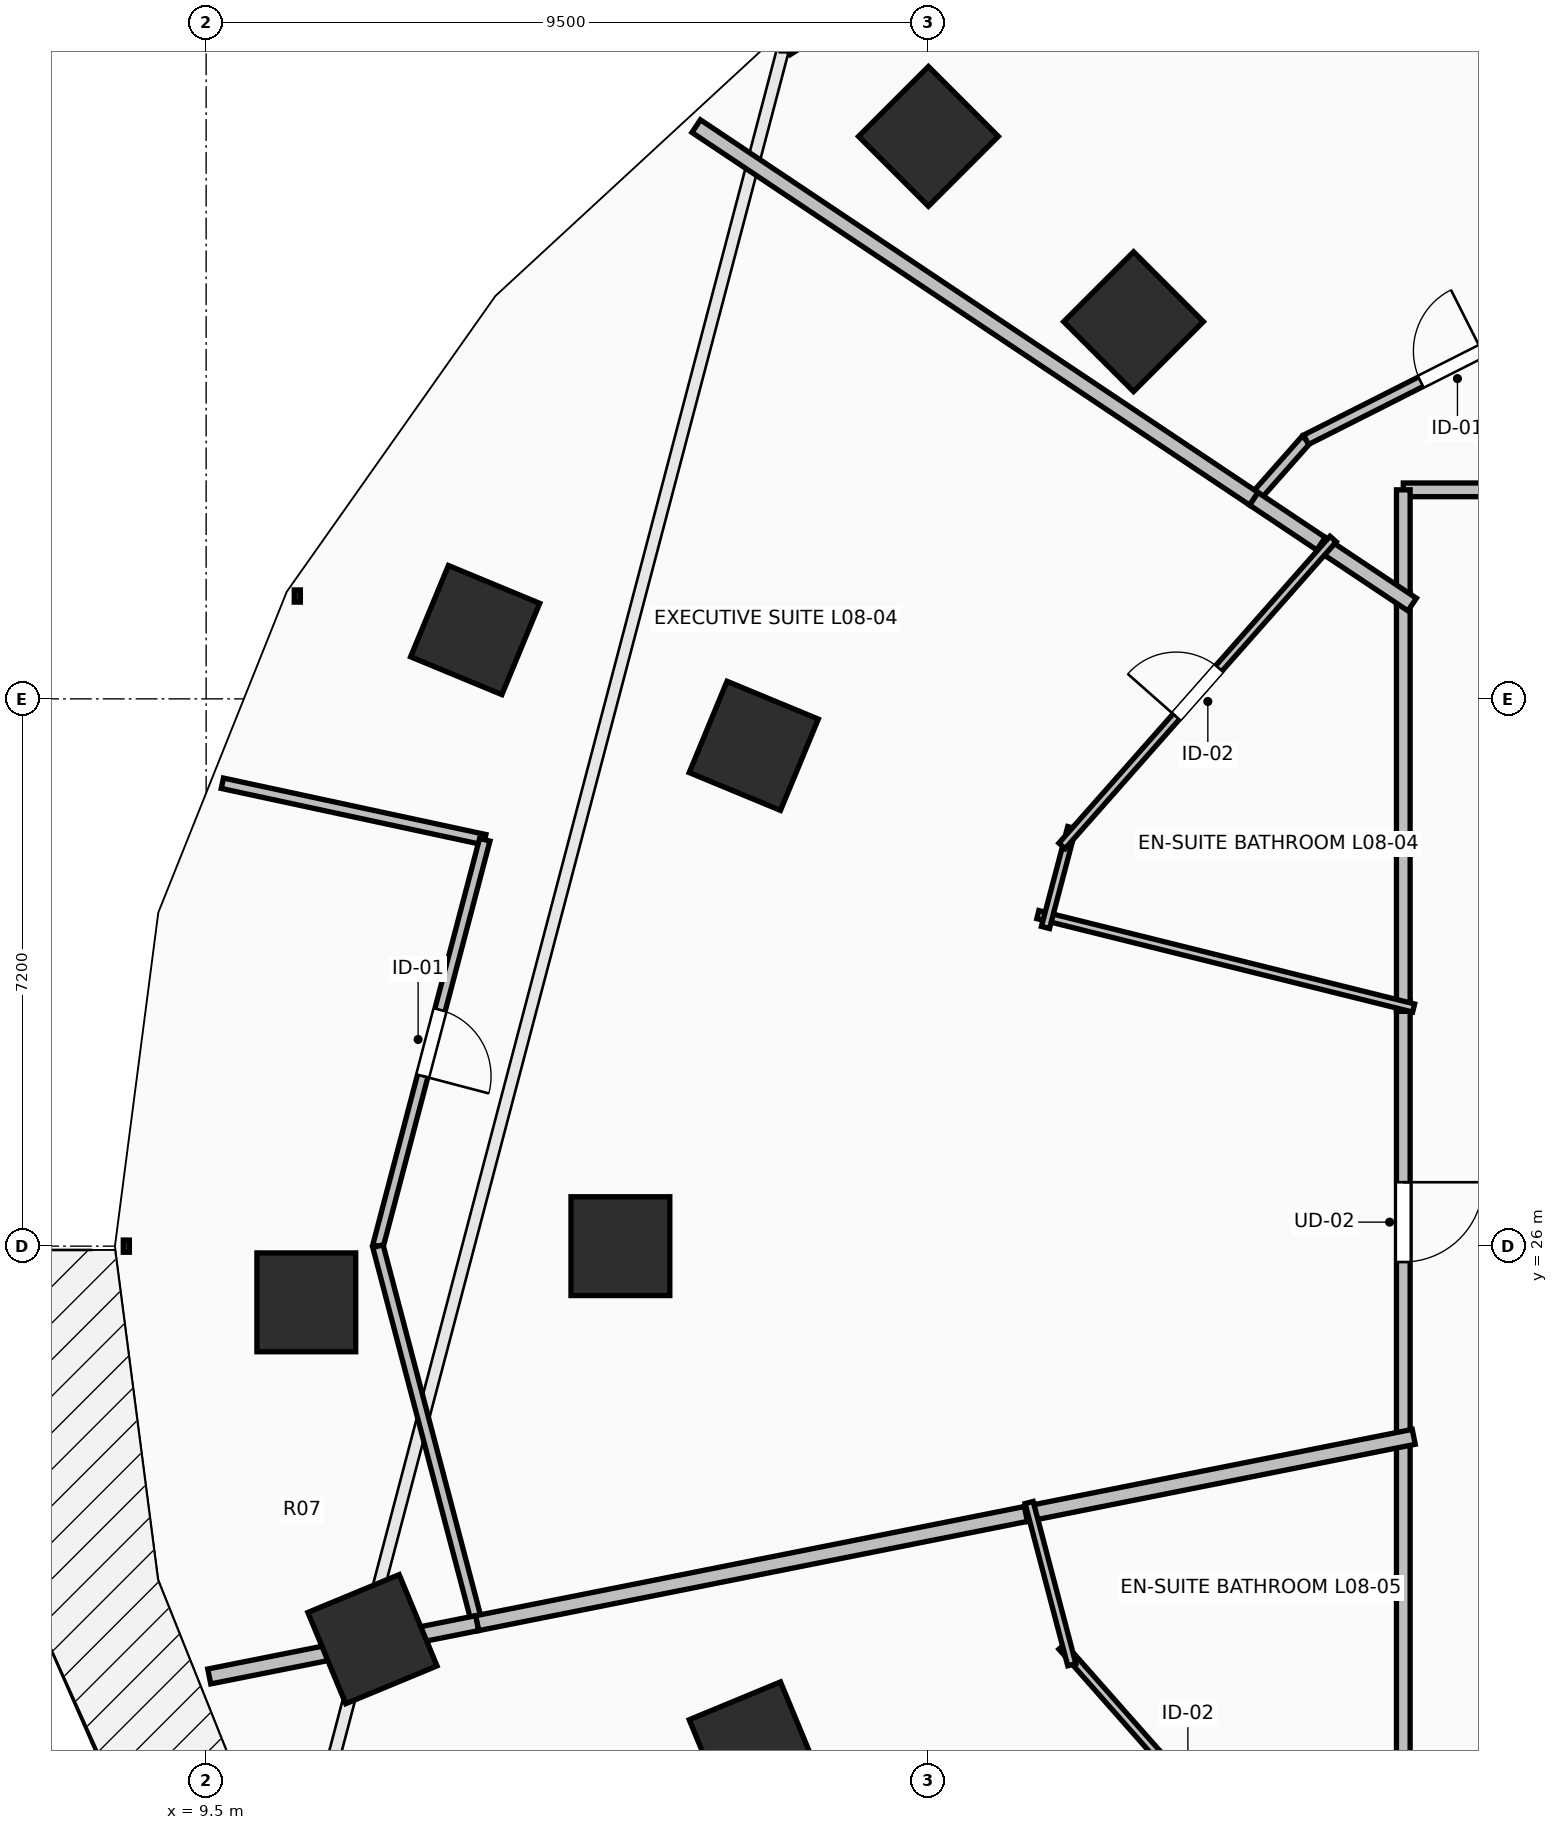
"""IFC4 building model, lengths in metres.
Left out: names, types, materials, properties, quantities, classifications, styles, units other than length and angle.
Written with IfcOpenShell. Run it as: python <this file> out.ifc"""

import sys

from ifc_helpers import new_model, si_unit, direction, frame, frame_2d, origin, origin_2d, place, context, subcontext, project, spatial, rectangle, extrude, element, fill, save


model = new_model("IFC4")
c1 = context("Model", 3, precision=1e-05, world=origin(), true_north=direction((0.0, 1.0)))
c2 = subcontext(c1, "Body", "Model", "MODEL_VIEW")
j1 = project(units=[si_unit("LENGTHUNIT", "METRE"), si_unit("PLANEANGLEUNIT", "RADIAN")], contexts=[c1])
p1 = place(None, origin())
s1 = spatial("IfcSite", under=j1, at=p1, CompositionType="ELEMENT")
p2 = place(p1, origin())
s2 = spatial("IfcBuilding", under=s1, at=p2, CompositionType="ELEMENT")
p3 = place(p2, frame((0.0, 0.0, 34.5)))
s3 = spatial("IfcBuildingStorey", under=s2, at=p3, CompositionType="ELEMENT", Elevation=34.5)
for number, where, z_axis, x_axis in (
    (1, (21.701, 38.162, 0.0), (0.0, 0.0, 1.0), (-0.707, 0.707, 0.0)),
    (2, (16.705, 32.582, 0.0), (0.0, 0.0, 1.0), (-0.924, 0.383, 0.0)),
    (3, (14.95, 26.0, 0.0), (0.0, 0.0, 1.0), (-1.0, 0.0, 0.0)),
    (4, (16.705, 19.418, 0.0), (0.0, 0.0, 1.0), (-0.924, -0.383, 0.0)),
    (5, (19.003, 40.6, 0.0), (0.0, 0.0, 1.0), (-0.707, 0.707, 0.0)),
    (6, (13.039, 34.105, 0.0), (0.0, 0.0, 1.0), (-0.924, 0.383, 0.0)),
    (7, (10.818, 25.261, 0.0), (0.0, 0.0, 1.0), (-1.0, 0.0, 0.0)),
    (8, (11.688, 20.83, 0.0), (0.0, 0.0, 1.0), (-0.924, -0.383, 0.0)),
):
    element("IfcColumn", number, at=place(p3, frame(where, z_axis=z_axis, x_axis=x_axis)), inside=s3, PredefinedType="COLUMN", context=c2, shape_type="SweptSolid", body=[
        extrude(rectangle(XDim=1.3, YDim=1.3, at=origin_2d()), origin(), (0.0, 0.0, 1.0), 3.5),
    ])
p4 = place(p3, frame((21.583, 44.583, 0.0), z_axis=(0.0, 0.0, 1.0), x_axis=(-0.849633724826, -0.527373239404, 0.0)))
e9 = element("IfcWall", 9, at=p4, inside=s3, PredefinedType="STANDARD", context=c2, shape_type="SweptSolid", body=[
    extrude(rectangle(XDim=5.271, YDim=0.3, at=frame_2d((2.635, 0.0))), origin(), (0.0, 0.0, 1.0), 3.24),
])
p5 = place(p4, frame((1.885, 0.0, 0.85)))
e10 = element("IfcOpeningElement", 10, at=p5, cuts=e9, PredefinedType="OPENING", context=c2, shape_type="SweptSolid", body=[
    extrude(rectangle(XDim=1.5, YDim=2.19, at=frame_2d((0.75, 1.095))), frame((0.0, 0.165, 0.0), z_axis=(0.0, -1.0, 0.0), x_axis=(1.0, 0.0, 0.0)), (0.0, 0.0, 1.0), 0.33),
])
p6 = place(p3, frame((29.822, 35.95, 0.0), z_axis=(0.0, 0.0, 1.0), x_axis=(-1.0, 0.0, 0.0)))
e11 = element("IfcWall", 11, at=p6, inside=s3, PredefinedType="PARTITIONING", context=c2, shape_type="SweptSolid", body=[
    extrude(rectangle(XDim=4.572, YDim=0.18, at=frame_2d((2.286, 0.0))), origin(), (0.0, 0.0, 1.0), 2.432),
])
p7 = place(p6, frame((1.786, 0.0, 0.0)))
e12 = element("IfcOpeningElement", 12, at=p7, cuts=e11, PredefinedType="OPENING", context=c2, shape_type="SweptSolid", body=[
    extrude(rectangle(XDim=1.0, YDim=2.15, at=frame_2d((0.5, 1.075))), frame((0.0, 0.105, 0.0), z_axis=(0.0, -1.0, 0.0), x_axis=(1.0, 0.0, 0.0)), (0.0, 0.0, 1.0), 0.21),
])
p8 = place(p3, frame((25.25, 35.95, 0.0), z_axis=(0.0, 0.0, 1.0), x_axis=(0.0, -1.0, 0.0)))
e13 = element("IfcWall", 13, at=p8, inside=s3, PredefinedType="PARTITIONING", context=c2, shape_type="SweptSolid", body=[
    extrude(rectangle(XDim=1.491, YDim=0.18, at=frame_2d((0.746, 0.0))), origin(), (0.0, 0.0, 1.0), 2.432),
])
p9 = place(p3, frame((25.25, 29.229, 0.0), z_axis=(0.0, 0.0, 1.0), x_axis=(0.0, -1.0, 0.0)))
e14 = element("IfcWall", 14, at=p9, inside=s3, PredefinedType="PARTITIONING", context=c2, shape_type="SweptSolid", body=[
    extrude(rectangle(XDim=5.826, YDim=0.18, at=frame_2d((2.913, 0.0))), origin(), (0.0, 0.0, 1.0), 2.432),
])
p10 = place(p9, frame((2.388, 0.0, 0.0)))
e15 = element("IfcOpeningElement", 15, at=p10, cuts=e14, PredefinedType="OPENING", context=c2, shape_type="SweptSolid", body=[
    extrude(rectangle(XDim=1.05, YDim=2.2, at=frame_2d((0.525, 1.1))), frame((0.0, 0.105, 0.0), z_axis=(0.0, -1.0, 0.0), x_axis=(1.0, 0.0, 0.0)), (0.0, 0.0, 1.0), 0.21),
])
p11 = place(p3, frame((25.25, 34.599, 0.0), z_axis=(0.0, 0.0, 1.0), x_axis=(0.0, -1.0, 0.0)))
e16 = element("IfcWall", 16, at=p11, inside=s3, PredefinedType="PARTITIONING", context=c2, shape_type="SweptSolid", body=[
    extrude(rectangle(XDim=5.51, YDim=0.18, at=frame_2d((2.755, 0.0))), origin(), (0.0, 0.0, 1.0), 2.432),
])
p12 = place(p3, frame((25.25, 23.543, 0.0), z_axis=(0.0, 0.0, 1.0), x_axis=(0.0, -1.0, 0.0)))
e17 = element("IfcWall", 17, at=p12, inside=s3, PredefinedType="PARTITIONING", context=c2, shape_type="SweptSolid", body=[
    extrude(rectangle(XDim=5.299, YDim=0.18, at=frame_2d((2.649, 0.0))), origin(), (0.0, 0.0, 1.0), 3.24),
])
p13 = place(p3, frame((23.284, 35.832, 0.0), z_axis=(0.0, 0.0, 1.0), x_axis=(0.662462125237, 0.749095409561, 0.0)))
e18 = element("IfcWall", 18, at=p13, inside=s3, PredefinedType="PARTITIONING", context=c2, shape_type="SweptSolid", body=[
    extrude(rectangle(XDim=1.037, YDim=0.14, at=frame_2d((0.519, 0.0))), origin(), (0.0, 0.0, 1.0), 2.432),
])
p14 = place(p3, frame((23.971, 36.609, 0.0), z_axis=(0.0, 0.0, 1.0), x_axis=(0.892445030909, 0.451156144596, 0.0)))
e19 = element("IfcWall", 19, at=p14, inside=s3, PredefinedType="PARTITIONING", context=c2, shape_type="SweptSolid", body=[
    extrude(rectangle(XDim=4.281, YDim=0.14, at=frame_2d((2.14, 0.0))), origin(), (0.0, 0.0, 1.0), 3.24),
])
p15 = place(p14, frame((1.69, 0.0, 0.0)))
e20 = element("IfcOpeningElement", 20, at=p15, cuts=e19, PredefinedType="OPENING", context=c2, shape_type="SweptSolid", body=[
    extrude(rectangle(XDim=0.9, YDim=2.1, at=frame_2d((0.45, 1.05))), frame((0.0, 0.085, 0.0), z_axis=(0.0, -1.0, 0.0), x_axis=(1.0, 0.0, 0.0)), (0.0, 0.0, 1.0), 0.17),
])
p16 = place(p3, frame((15.947, 40.735, 0.0), z_axis=(0.0, 0.0, 1.0), x_axis=(0.831432604336, -0.555625615363, 0.0)))
e21 = element("IfcWall", 21, at=p16, inside=s3, PredefinedType="PARTITIONING", context=c2, shape_type="SweptSolid", body=[
    extrude(rectangle(XDim=8.824, YDim=0.2, at=frame_2d((4.412, 0.0))), origin(), (0.0, 0.0, 1.0), 2.624),
])
p17 = place(p3, frame((23.284, 35.832, 0.0), z_axis=(0.0, 0.0, 1.0), x_axis=(0.831550226979, -0.555449565677, 0.0)))
e22 = element("IfcWall", 22, at=p17, inside=s3, PredefinedType="PARTITIONING", context=c2, shape_type="SweptSolid", body=[
    extrude(rectangle(XDim=1.203, YDim=0.2, at=frame_2d((0.601, 0.0))), origin(), (0.0, 0.0, 1.0), 2.972),
])
p18 = place(p3, frame((24.167, 35.241, 0.0), z_axis=(0.0, 0.0, 1.0), x_axis=(0.831815696492, -0.555051931868, 0.0)))
e23 = element("IfcWall", 23, at=p18, inside=s3, PredefinedType="PARTITIONING", context=c2, shape_type="SweptSolid", body=[
    extrude(rectangle(XDim=1.441, YDim=0.2, at=frame_2d((0.721, 0.0))), origin(), (0.0, 0.0, 1.0), 2.972),
])
p19 = place(p3, frame((25.386, 29.133, 0.0), z_axis=(0.0, 0.0, 1.0), x_axis=(-0.970485458541, 0.241159645796, 0.0)))
e24 = element("IfcWall", 24, at=p19, inside=s3, PredefinedType="PARTITIONING", context=c2, shape_type="SweptSolid", body=[
    extrude(rectangle(XDim=5.094, YDim=0.11, at=frame_2d((2.547, 0.0))), origin(), (0.0, 0.0, 1.0), 2.432),
])
p20 = place(p3, frame((20.542, 30.193, 0.0), z_axis=(0.0, 0.0, 1.0), x_axis=(0.254988593673, 0.966944060997, 0.0)))
e25 = element("IfcWall", 25, at=p20, inside=s3, PredefinedType="PARTITIONING", context=c2, shape_type="SweptSolid", body=[
    extrude(rectangle(XDim=1.359, YDim=0.11, at=frame_2d((0.679, 0.0))), origin(), (0.0, 0.0, 1.0), 2.432),
])
p21 = place(p3, frame((20.76, 31.266, 0.0), z_axis=(0.0, 0.0, 1.0), x_axis=(0.662087707802, 0.749426358742, 0.0)))
e26 = element("IfcWall", 26, at=p21, inside=s3, PredefinedType="PARTITIONING", context=c2, shape_type="SweptSolid", body=[
    extrude(rectangle(XDim=5.387, YDim=0.11, at=frame_2d((2.693, 0.0))), origin(), (0.0, 0.0, 1.0), 2.972),
])
p22 = place(p21, frame((2.268, 0.0, 0.0)))
e27 = element("IfcOpeningElement", 27, at=p22, cuts=e26, PredefinedType="OPENING", context=c2, shape_type="SweptSolid", body=[
    extrude(rectangle(XDim=0.85, YDim=2.1, at=frame_2d((0.425, 1.05))), frame((0.0, 0.07, 0.0), z_axis=(0.0, -1.0, 0.0), x_axis=(1.0, 0.0, 0.0)), (0.0, 0.0, 1.0), 0.14),
])
p23 = place(p3, frame((9.713, 32.09, 0.0), z_axis=(0.0, 0.0, 1.0), x_axis=(0.977615913399, -0.210397542448, 0.0)))
e28 = element("IfcWall", 28, at=p23, inside=s3, PredefinedType="PARTITIONING", context=c2, shape_type="SweptSolid", body=[
    extrude(rectangle(XDim=3.532, YDim=0.14, at=frame_2d((1.766, 0.0))), origin(), (0.0, 0.0, 1.0), 2.624),
])
p24 = place(p3, frame((13.166, 31.347, 0.0), z_axis=(0.0, 0.0, 1.0), x_axis=(-0.25431071056, -0.967122568496, 0.0)))
e29 = element("IfcWall", 29, at=p24, inside=s3, PredefinedType="PARTITIONING", context=c2, shape_type="SweptSolid", body=[
    extrude(rectangle(XDim=5.529, YDim=0.14, at=frame_2d((2.764, 0.0))), origin(), (0.0, 0.0, 1.0), 3.24),
])
p25 = place(p24, frame((2.314, 0.0, 0.0)))
e30 = element("IfcOpeningElement", 30, at=p25, cuts=e29, PredefinedType="OPENING", context=c2, shape_type="SweptSolid", body=[
    extrude(rectangle(XDim=0.9, YDim=2.1, at=frame_2d((0.45, 1.05))), frame((0.0, 0.085, 0.0), z_axis=(0.0, -1.0, 0.0), x_axis=(1.0, 0.0, 0.0)), (0.0, 0.0, 1.0), 0.17),
])
p26 = place(p3, frame((11.76, 26.0, 0.0), z_axis=(0.0, 0.0, 1.0), x_axis=(0.254434720755, -0.967089950767, 0.0)))
e31 = element("IfcWall", 31, at=p26, inside=s3, PredefinedType="PARTITIONING", context=c2, shape_type="SweptSolid", body=[
    extrude(rectangle(XDim=5.129, YDim=0.14, at=frame_2d((2.564, 0.0))), origin(), (0.0, 0.0, 1.0), 2.432),
])
p27 = place(p3, frame((13.065, 21.04, 0.0), z_axis=(0.0, 0.0, 1.0), x_axis=(0.980774220135, 0.195145917502, 0.0)))
e32 = element("IfcWall", 32, at=p27, inside=s3, PredefinedType="PARTITIONING", context=c2, shape_type="SweptSolid", body=[
    extrude(rectangle(XDim=7.501, YDim=0.2, at=frame_2d((3.751, 0.0))), origin(), (0.0, 0.0, 1.0), 2.922),
])
p28 = place(p3, frame((20.285, 22.476, 0.0), z_axis=(0.0, 0.0, 1.0), x_axis=(0.980785905074, 0.195087181559, 0.0)))
e33 = element("IfcWall", 33, at=p28, inside=s3, PredefinedType="PARTITIONING", context=c2, shape_type="SweptSolid", body=[
    extrude(rectangle(XDim=5.202, YDim=0.2, at=frame_2d((2.601, 0.0))), origin(), (0.0, 0.0, 1.0), 2.972),
])
p29 = place(p3, frame((9.541, 20.339, 0.0), z_axis=(0.0, 0.0, 1.0), x_axis=(0.980786594985, 0.195083713053, 0.0)))
e34 = element("IfcWall", 34, at=p29, inside=s3, PredefinedType="PARTITIONING", context=c2, shape_type="SweptSolid", body=[
    extrude(rectangle(XDim=3.593, YDim=0.2, at=frame_2d((1.796, 0.0))), origin(), (0.0, 0.0, 1.0), 2.432),
])
p30 = place(p3, frame((23.802, 17.291, 0.0), z_axis=(0.0, 0.0, 1.0), x_axis=(-0.662071486681, 0.74944068913, 0.0)))
e35 = element("IfcWall", 35, at=p30, inside=s3, PredefinedType="PARTITIONING", context=c2, shape_type="SweptSolid", body=[
    extrude(rectangle(XDim=4.594, YDim=0.11, at=frame_2d((2.297, 0.0))), origin(), (0.0, 0.0, 1.0), 2.432),
])
p31 = place(p30, frame((1.872, 0.0, 0.0)))
e36 = element("IfcOpeningElement", 36, at=p31, cuts=e35, PredefinedType="OPENING", context=c2, shape_type="SweptSolid", body=[
    extrude(rectangle(XDim=0.85, YDim=2.1, at=frame_2d((0.425, 1.05))), frame((0.0, 0.07, 0.0), z_axis=(0.0, -1.0, 0.0), x_axis=(1.0, 0.0, 0.0)), (0.0, 0.0, 1.0), 0.14),
])
p32 = place(p3, frame((20.889, 20.494, 0.0), z_axis=(0.0, 0.0, 1.0), x_axis=(-0.254389812051, 0.967101764823, 0.0)))
e37 = element("IfcWall", 37, at=p32, inside=s3, PredefinedType="PARTITIONING", context=c2, shape_type="SweptSolid", body=[
    extrude(rectangle(XDim=2.206, YDim=0.11, at=frame_2d((1.103, 0.0))), origin(), (0.0, 0.0, 1.0), 3.24),
])
p33 = place(p10, origin())
e38 = element("IfcDoor", 38, at=p33, inside=s3, OperationType="SINGLE_SWING_LEFT", PredefinedType="DOOR", context=c2, shape_type="SweptSolid", body=[
    extrude(rectangle(XDim=1.05, YDim=2.2, at=frame_2d((0.525, 1.1))), frame((0.0, 0.025, 0.0), z_axis=(0.0, -1.0, 0.0), x_axis=(1.0, 0.0, 0.0)), (0.0, 0.0, 1.0), 0.05),
])
fill(e15, e38)
p34 = place(p15, origin())
e39 = element("IfcDoor", 39, at=p34, inside=s3, OperationType="SINGLE_SWING_RIGHT", PredefinedType="DOOR", context=c2, shape_type="SweptSolid", body=[
    extrude(rectangle(XDim=0.9, YDim=2.1, at=frame_2d((0.45, 1.05))), frame((0.0, 0.025, 0.0), z_axis=(0.0, -1.0, 0.0), x_axis=(1.0, 0.0, 0.0)), (0.0, 0.0, 1.0), 0.05),
])
fill(e20, e39)
p35 = place(p22, origin())
e40 = element("IfcDoor", 40, at=p35, inside=s3, OperationType="SINGLE_SWING_LEFT", PredefinedType="DOOR", context=c2, shape_type="SweptSolid", body=[
    extrude(rectangle(XDim=0.85, YDim=2.1, at=frame_2d((0.425, 1.05))), frame((0.0, 0.025, 0.0), z_axis=(0.0, -1.0, 0.0), x_axis=(1.0, 0.0, 0.0)), (0.0, 0.0, 1.0), 0.05),
])
fill(e27, e40)
p36 = place(p25, origin())
e41 = element("IfcDoor", 41, at=p36, inside=s3, OperationType="SINGLE_SWING_RIGHT", PredefinedType="DOOR", context=c2, shape_type="SweptSolid", body=[
    extrude(rectangle(XDim=0.9, YDim=2.1, at=frame_2d((0.45, 1.05))), frame((0.0, 0.025, 0.0), z_axis=(0.0, -1.0, 0.0), x_axis=(1.0, 0.0, 0.0)), (0.0, 0.0, 1.0), 0.05),
])
fill(e30, e41)
save(model, sys.argv[1])
